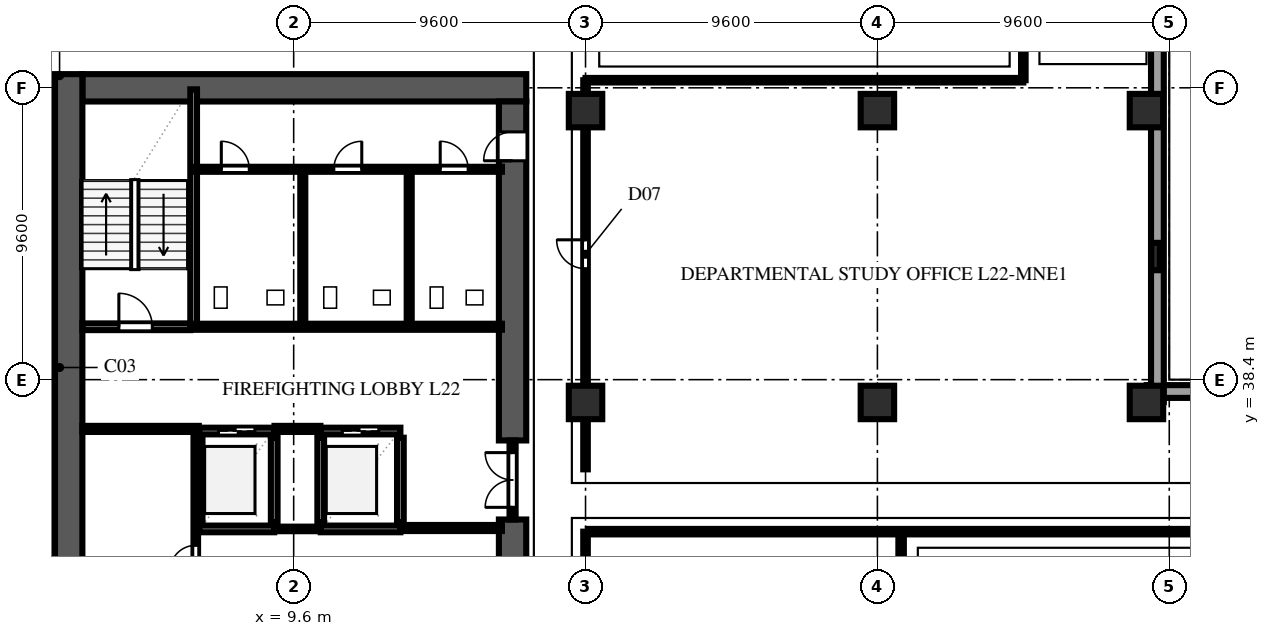
"""IFC4 building model, lengths in metres.
Left out: names, types, materials, properties, quantities, classifications, styles, units other than length and angle.
Written with IfcOpenShell. Run it as: python <this file> out.ifc"""

import sys

from ifc_helpers import new_model, si_unit, direction, frame, frame_2d, origin, origin_2d, place, context, subcontext, project, spatial, rectangle, extrude, element, fill, save


model = new_model("IFC4")
c1 = context("Model", 3, precision=1e-05, world=origin(), true_north=direction((0.0, 1.0)))
c2 = subcontext(c1, "Body", "Model", "MODEL_VIEW")
j1 = project(units=[si_unit("LENGTHUNIT", "METRE"), si_unit("PLANEANGLEUNIT", "RADIAN")], contexts=[c1])
p1 = place(None, origin())
s1 = spatial("IfcSite", under=j1, at=p1, CompositionType="ELEMENT")
p2 = place(p1, origin())
s2 = spatial("IfcBuilding", under=s1, at=p2, CompositionType="ELEMENT")
p3 = place(p2, frame((0.0, 0.0, 88.8)))
s3 = spatial("IfcBuildingStorey", under=s2, at=p3, CompositionType="ELEMENT", Elevation=88.8)
p4 = place(p3, frame((2.65, 48.0, 0.0), z_axis=(0.0, 0.0, 1.0), x_axis=(1.0, 0.0, 0.0)))
e1 = element("IfcWall", 1, at=p4, inside=s3, PredefinedType="SHEAR", context=c2, shape_type="SweptSolid", body=[
    extrude(rectangle(XDim=14.6, YDim=0.9, at=frame_2d((7.3, 0.0))), origin(), (0.0, 0.0, 1.0), 3.54),
])
p5 = place(p3, frame((2.2, 9.15, 0.0), z_axis=(0.0, 0.0, 1.0), x_axis=(0.0, 1.0, 0.0)))
e2 = element("IfcWall", 2, at=p5, inside=s3, PredefinedType="SHEAR", context=c2, shape_type="SweptSolid", body=[
    extrude(rectangle(XDim=39.3, YDim=0.9, at=frame_2d((19.65, 0.0))), origin(), (0.0, 0.0, 1.0), 3.54),
])
p6 = place(p3, frame((16.8, 26.0, 0.0), z_axis=(0.0, 0.0, 1.0), x_axis=(0.0, 1.0, 0.0)))
e3 = element("IfcWall", 3, at=p6, inside=s3, PredefinedType="SHEAR", context=c2, shape_type="SweptSolid", body=[
    extrude(rectangle(XDim=7.8, YDim=0.9, at=frame_2d((3.9, 0.0))), origin(), (0.0, 0.0, 1.0), 3.54),
])
p7 = place(p3, frame((16.8, 36.4, 0.0), z_axis=(0.0, 0.0, 1.0), x_axis=(0.0, 1.0, 0.0)))
e4 = element("IfcWall", 4, at=p7, inside=s3, PredefinedType="SHEAR", context=c2, shape_type="SweptSolid", body=[
    extrude(rectangle(XDim=11.15, YDim=0.9, at=frame_2d((5.575, 0.0))), origin(), (0.0, 0.0, 1.0), 3.54),
])
p8 = place(p7, frame((9.2, 0.0, 0.0)))
e5 = element("IfcOpeningElement", 5, at=p8, cuts=e4, PredefinedType="OPENING", context=c2, shape_type="SweptSolid", body=[
    extrude(rectangle(XDim=0.95, YDim=2.15, at=frame_2d((0.475, 1.075))), frame((0.0, 0.462, 0.0), z_axis=(0.0, -1.0, 0.0), x_axis=(1.0, 0.0, 0.0)), (0.0, 0.0, 1.0), 0.924),
])
for number, where, z_axis, x_axis in (
    (6, (19.2, 37.65, 0.0), (0.0, 0.0, 1.0), (1.0, 0.0, 0.0)),
    (7, (19.2, 47.25, 0.0), (0.0, 0.0, 1.0), (1.0, 0.0, 0.0)),
    (8, (28.8, 37.65, 0.0), (0.0, 0.0, 1.0), (1.0, 0.0, 0.0)),
    (9, (28.8, 47.25, 0.0), (0.0, 0.0, 1.0), (1.0, 0.0, 0.0)),
    (10, (37.65, 37.65, 0.0), (0.0, 0.0, 1.0), (1.0, 0.0, 0.0)),
    (11, (37.65, 47.25, 0.0), (0.0, 0.0, 1.0), (1.0, 0.0, 0.0)),
):
    element("IfcColumn", number, at=place(p3, frame(where, z_axis=z_axis, x_axis=x_axis)), inside=s3, PredefinedType="COLUMN", context=c2, shape_type="SweptSolid", body=[
        extrude(rectangle(XDim=1.1, YDim=1.1, at=origin_2d()), origin(), (0.0, 0.0, 1.0), 3.8),
    ])
p9 = place(p3, frame((37.95, 42.45, 0.0), z_axis=(0.0, 0.0, 1.0), x_axis=(0.0, 1.0, 0.0)))
e12 = element("IfcColumn", 12, at=p9, inside=s3, PredefinedType="PILASTER", context=c2, shape_type="SweptSolid", body=[
    extrude(rectangle(XDim=0.9, YDim=0.28, at=origin_2d()), origin(), (0.0, 0.0, 1.0), 3.8),
])
for number, where, z_axis, x_axis in (
    (13, (65.36, 38.01, 0.0), (0.0, 0.0, 1.0), (-1.0, 0.0, 0.0)),
    (14, (38.01, 37.66, 0.0), (0.0, 0.0, 1.0), (0.0, 1.0, 0.0)),
):
    element("IfcWall", number, at=place(p3, frame(where, z_axis=z_axis, x_axis=x_axis)), inside=s3, PredefinedType="SOLIDWALL", context=c2, shape_type="SweptSolid", body=[
        extrude(rectangle(XDim=27.7, YDim=0.42, at=frame_2d((13.85, 0.0))), origin(), (0.0, 0.0, 1.0), 3.54),
    ])
p10 = place(p3, frame((2.65, 40.14, 0.0), z_axis=(0.0, 0.0, 1.0), x_axis=(1.0, 0.0, 0.0)))
e15 = element("IfcWall", 15, at=p10, inside=s3, PredefinedType="SOLIDWALL", context=c2, shape_type="SweptSolid", body=[
    extrude(rectangle(XDim=3.55, YDim=0.22, at=frame_2d((1.775, 0.0))), origin(), (0.0, 0.0, 1.0), 3.54),
])
p11 = place(p10, frame((1.2, 0.0, 0.0)))
e16 = element("IfcOpeningElement", 16, at=p11, cuts=e15, PredefinedType="OPENING", context=c2, shape_type="SweptSolid", body=[
    extrude(rectangle(XDim=1.1, YDim=2.2, at=frame_2d((0.55, 1.1))), frame((0.0, 0.122, 0.0), z_axis=(0.0, -1.0, 0.0), x_axis=(1.0, 0.0, 0.0)), (0.0, 0.0, 1.0), 0.244),
])
p12 = place(p3, frame((6.31, 40.14, 0.0), z_axis=(0.0, 0.0, 1.0), x_axis=(0.0, 1.0, 0.0)))
e17 = element("IfcWall", 17, at=p12, inside=s3, PredefinedType="SOLIDWALL", context=c2, shape_type="SweptSolid", body=[
    extrude(rectangle(XDim=7.81, YDim=0.22, at=frame_2d((3.905, 0.0))), origin(), (0.0, 0.0, 1.0), 3.54),
])
for number, where, z_axis, x_axis in (
    (18, (6.49, 33.71, 0.0), (0.0, 0.0, 1.0), (0.0, 1.0, 0.0)),
    (19, (8.96, 33.71, 0.0), (0.0, 0.0, 1.0), (0.0, 1.0, 0.0)),
):
    element("IfcWall", number, at=place(p3, frame(where, z_axis=z_axis, x_axis=x_axis)), inside=s3, PredefinedType="SOLIDWALL", context=c2, shape_type="SweptSolid", body=[
        extrude(rectangle(XDim=2.78, YDim=0.22, at=frame_2d((1.39, 0.0))), origin(), (0.0, 0.0, 1.0), 3.54),
    ])
p13 = place(p3, frame((6.49, 33.49, 0.0), z_axis=(0.0, 0.0, 1.0), x_axis=(1.0, 0.0, 0.0)))
e20 = element("IfcWall", 20, at=p13, inside=s3, PredefinedType="SOLIDWALL", context=c2, shape_type="SweptSolid", body=[
    extrude(rectangle(XDim=2.47, YDim=0.22, at=frame_2d((1.235, 0.0))), origin(), (0.0, 0.0, 1.0), 3.54),
])
p14 = place(p3, frame((6.49, 36.71, 0.0), z_axis=(0.0, 0.0, 1.0), x_axis=(1.0, 0.0, 0.0)))
e21 = element("IfcWall", 21, at=p14, inside=s3, PredefinedType="SOLIDWALL", context=c2, shape_type="SweptSolid", body=[
    extrude(rectangle(XDim=2.47, YDim=0.22, at=frame_2d((1.235, 0.0))), origin(), (0.0, 0.0, 1.0), 3.54),
])
p15 = place(p14, frame((0.635, 0.0, 0.0)))
e22 = element("IfcOpeningElement", 22, at=p15, cuts=e21, PredefinedType="OPENING", context=c2, shape_type="SweptSolid", body=[
    extrude(rectangle(XDim=1.2, YDim=2.2, at=frame_2d((0.6, 1.1))), frame((0.0, 0.122, 0.0), z_axis=(0.0, -1.0, 0.0), x_axis=(1.0, 0.0, 0.0)), (0.0, 0.0, 1.0), 0.244),
])
for number, where, z_axis, x_axis in (
    (23, (10.49, 33.71, 0.0), (0.0, 0.0, 1.0), (0.0, 1.0, 0.0)),
    (24, (13.11, 33.71, 0.0), (0.0, 0.0, 1.0), (0.0, 1.0, 0.0)),
):
    element("IfcWall", number, at=place(p3, frame(where, z_axis=z_axis, x_axis=x_axis)), inside=s3, PredefinedType="SOLIDWALL", context=c2, shape_type="SweptSolid", body=[
        extrude(rectangle(XDim=2.78, YDim=0.22, at=frame_2d((1.39, 0.0))), origin(), (0.0, 0.0, 1.0), 3.54),
    ])
p16 = place(p3, frame((10.49, 33.49, 0.0), z_axis=(0.0, 0.0, 1.0), x_axis=(1.0, 0.0, 0.0)))
e25 = element("IfcWall", 25, at=p16, inside=s3, PredefinedType="SOLIDWALL", context=c2, shape_type="SweptSolid", body=[
    extrude(rectangle(XDim=2.62, YDim=0.22, at=frame_2d((1.31, 0.0))), origin(), (0.0, 0.0, 1.0), 3.54),
])
p17 = place(p3, frame((10.49, 36.71, 0.0), z_axis=(0.0, 0.0, 1.0), x_axis=(1.0, 0.0, 0.0)))
e26 = element("IfcWall", 26, at=p17, inside=s3, PredefinedType="SOLIDWALL", context=c2, shape_type="SweptSolid", body=[
    extrude(rectangle(XDim=2.62, YDim=0.22, at=frame_2d((1.31, 0.0))), origin(), (0.0, 0.0, 1.0), 3.54),
])
p18 = place(p17, frame((0.71, 0.0, 0.0)))
e27 = element("IfcOpeningElement", 27, at=p18, cuts=e26, PredefinedType="OPENING", context=c2, shape_type="SweptSolid", body=[
    extrude(rectangle(XDim=1.2, YDim=2.2, at=frame_2d((0.6, 1.1))), frame((0.0, 0.122, 0.0), z_axis=(0.0, -1.0, 0.0), x_axis=(1.0, 0.0, 0.0)), (0.0, 0.0, 1.0), 0.244),
])
p19 = place(p3, frame((2.65, 36.78, 0.0), z_axis=(0.0, 0.0, 1.0), x_axis=(1.0, 0.0, 0.0)))
e28 = element("IfcWall", 28, at=p19, inside=s3, PredefinedType="SOLIDWALL", context=c2, shape_type="SweptSolid", body=[
    extrude(rectangle(XDim=3.83, YDim=0.2, at=frame_2d((1.915, 0.0))), origin(), (0.0, 0.0, 1.0), 3.54),
])
p20 = place(p3, frame((8.97, 36.78, 0.0), z_axis=(0.0, 0.0, 1.0), x_axis=(1.0, 0.0, 0.0)))
e29 = element("IfcWall", 29, at=p20, inside=s3, PredefinedType="SOLIDWALL", context=c2, shape_type="SweptSolid", body=[
    extrude(rectangle(XDim=1.51, YDim=0.2, at=frame_2d((0.755, 0.0))), origin(), (0.0, 0.0, 1.0), 3.54),
])
p21 = place(p3, frame((13.12, 33.52, 0.0), z_axis=(0.0, 0.0, 1.0), x_axis=(1.0, 0.0, 0.0)))
e30 = element("IfcWall", 30, at=p21, inside=s3, PredefinedType="SOLIDWALL", context=c2, shape_type="SweptSolid", body=[
    extrude(rectangle(XDim=3.33, YDim=0.2, at=frame_2d((1.665, 0.0))), origin(), (0.0, 0.0, 1.0), 3.54),
])
p22 = place(p3, frame((6.32, 40.14, 0.0), z_axis=(0.0, 0.0, 1.0), x_axis=(1.0, 0.0, 0.0)))
e31 = element("IfcWall", 31, at=p22, inside=s3, PredefinedType="SOLIDWALL", context=c2, shape_type="SweptSolid", body=[
    extrude(rectangle(XDim=10.13, YDim=0.2, at=frame_2d((5.065, 0.0))), origin(), (0.0, 0.0, 1.0), 3.54),
])
p23 = place(p3, frame((16.8, 33.8, 0.0), z_axis=(0.0, 0.0, 1.0), x_axis=(0.0, 1.0, 0.0)))
e32 = element("IfcWall", 32, at=p23, inside=s3, PredefinedType="SOLIDWALL", context=c2, shape_type="SweptSolid", body=[
    extrude(rectangle(XDim=2.6, YDim=0.2, at=frame_2d((1.3, 0.0))), origin(), (0.0, 0.0, 1.0), 3.54),
])
p24 = place(p23, frame((0.4, 0.0, 0.0)))
e33 = element("IfcOpeningElement", 33, at=p24, cuts=e32, PredefinedType="OPENING", context=c2, shape_type="SweptSolid", body=[
    extrude(rectangle(XDim=1.8, YDim=2.2, at=frame_2d((0.9, 1.1))), frame((0.0, 0.112, 0.0), z_axis=(0.0, -1.0, 0.0), x_axis=(1.0, 0.0, 0.0)), (0.0, 0.0, 1.0), 0.224),
])
p25 = place(p3, frame((8.965, 33.49, 0.0), z_axis=(0.0, 0.0, 1.0), x_axis=(1.0, 0.0, 0.0)))
e34 = element("IfcWall", 34, at=p25, inside=s3, PredefinedType="PARTITIONING", context=c2, shape_type="SweptSolid", body=[
    extrude(rectangle(XDim=1.52, YDim=0.15, at=frame_2d((0.76, 0.0))), origin(), (0.0, 0.0, 1.0), 3.54),
])
p26 = place(p3, frame((6.38, 17.8, 0.0), z_axis=(0.0, 0.0, 1.0), x_axis=(0.0, 1.0, 0.0)))
e35 = element("IfcWall", 35, at=p26, inside=s3, PredefinedType="PARTITIONING", context=c2, shape_type="SweptSolid", body=[
    extrude(rectangle(XDim=18.98, YDim=0.15, at=frame_2d((9.49, 0.0))), origin(), (0.0, 0.0, 1.0), 3.54),
])
p27 = place(p26, frame((14.3, 0.0, 0.0)))
e36 = element("IfcOpeningElement", 36, at=p27, cuts=e35, PredefinedType="OPENING", context=c2, shape_type="SweptSolid", body=[
    extrude(rectangle(XDim=0.85, YDim=2.1, at=frame_2d((0.425, 1.05))), frame((0.0, 0.087, 0.0), z_axis=(0.0, -1.0, 0.0), x_axis=(1.0, 0.0, 0.0)), (0.0, 0.0, 1.0), 0.174),
])
p28 = place(p3, frame((6.32, 45.32, 0.0), z_axis=(0.0, 0.0, 1.0), x_axis=(1.0, 0.0, 0.0)))
e37 = element("IfcWall", 37, at=p28, inside=s3, PredefinedType="PLUMBINGWALL", context=c2, shape_type="SweptSolid", body=[
    extrude(rectangle(XDim=10.13, YDim=0.165, at=frame_2d((5.065, 0.0))), origin(), (0.0, 0.0, 1.0), 3.54),
])
p29 = place(p28, frame((0.9, 0.0, 0.0)))
e38 = element("IfcOpeningElement", 38, at=p29, cuts=e37, PredefinedType="OPENING", context=c2, shape_type="SweptSolid", body=[
    extrude(rectangle(XDim=0.92, YDim=2.15, at=frame_2d((0.46, 1.075))), frame((0.0, 0.094, 0.0), z_axis=(0.0, -1.0, 0.0), x_axis=(1.0, 0.0, 0.0)), (0.0, 0.0, 1.0), 0.189),
])
p30 = place(p28, frame((4.6, 0.0, 0.0)))
e39 = element("IfcOpeningElement", 39, at=p30, cuts=e37, PredefinedType="OPENING", context=c2, shape_type="SweptSolid", body=[
    extrude(rectangle(XDim=0.92, YDim=2.15, at=frame_2d((0.46, 1.075))), frame((0.0, 0.094, 0.0), z_axis=(0.0, -1.0, 0.0), x_axis=(1.0, 0.0, 0.0)), (0.0, 0.0, 1.0), 0.189),
])
p31 = place(p28, frame((8.1, 0.0, 0.0)))
e40 = element("IfcOpeningElement", 40, at=p31, cuts=e37, PredefinedType="OPENING", context=c2, shape_type="SweptSolid", body=[
    extrude(rectangle(XDim=0.92, YDim=2.15, at=frame_2d((0.46, 1.075))), frame((0.0, 0.094, 0.0), z_axis=(0.0, -1.0, 0.0), x_axis=(1.0, 0.0, 0.0)), (0.0, 0.0, 1.0), 0.189),
])
for number, where, z_axis, x_axis in (
    (41, (9.9, 40.4, 0.0), (0.0, 0.0, 1.0), (0.0, 1.0, 0.0)),
    (42, (13.4, 40.4, 0.0), (0.0, 0.0, 1.0), (0.0, 1.0, 0.0)),
):
    element("IfcWall", number, at=place(p3, frame(where, z_axis=z_axis, x_axis=x_axis)), inside=s3, PredefinedType="PLUMBINGWALL", context=c2, shape_type="SweptSolid", body=[
        extrude(rectangle(XDim=4.92, YDim=0.165, at=frame_2d((2.46, 0.0))), origin(), (0.0, 0.0, 1.0), 3.54),
    ])
p32 = place(p3, frame((0.85, 48.0, 0.0), z_axis=(0.0, 0.0, 1.0), x_axis=(1.0, 0.0, 0.0)))
e43 = element("IfcWall", 43, at=p32, inside=s3, PredefinedType="SOLIDWALL", context=c2, shape_type="SweptSolid", body=[
    extrude(rectangle(XDim=0.895, YDim=0.2, at=frame_2d((0.448, 0.0))), origin(), (0.0, 0.0, 1.0), 3.54),
])
p33 = place(p3, frame((19.2, 9.55, 0.0), z_axis=(0.0, 0.0, 1.0), x_axis=(0.0, 1.0, 0.0)))
e44 = element("IfcWall", 44, at=p33, inside=s3, PredefinedType="PARTITIONING", context=c2, shape_type="SweptSolid", body=[
    extrude(rectangle(XDim=23.85, YDim=0.15, at=frame_2d((11.925, 0.0))), origin(), (0.0, 0.0, 1.0), 2.924),
])
p34 = place(p33, frame((14.0, 0.0, 0.0)))
e45 = element("IfcOpeningElement", 45, at=p34, cuts=e44, PredefinedType="OPENING", context=c2, shape_type="SweptSolid", body=[
    extrude(rectangle(XDim=0.95, YDim=2.15, at=frame_2d((0.475, 1.075))), frame((0.0, 0.087, 0.0), z_axis=(0.0, -1.0, 0.0), x_axis=(1.0, 0.0, 0.0)), (0.0, 0.0, 1.0), 0.174),
])
p35 = place(p3, frame((29.58, 18.025, 0.0), z_axis=(0.0, 0.0, 1.0), x_axis=(0.0, 1.0, 0.0)))
e46 = element("IfcWall", 46, at=p35, inside=s3, PredefinedType="PARTITIONING", context=c2, shape_type="SweptSolid", body=[
    extrude(rectangle(XDim=15.28, YDim=0.18, at=frame_2d((7.64, 0.0))), origin(), (0.0, 0.0, 1.0), 3.54),
])
p36 = place(p3, frame((19.28, 33.4, 0.0), z_axis=(0.0, 0.0, 1.0), x_axis=(1.0, 0.0, 0.0)))
e47 = element("IfcWall", 47, at=p36, inside=s3, PredefinedType="PARTITIONING", context=c2, shape_type="SweptSolid", body=[
    extrude(rectangle(XDim=41.07, YDim=0.18, at=frame_2d((20.535, 0.0))), origin(), (0.0, 0.0, 1.0), 3.54),
])
p37 = place(p36, frame((22.67, 0.0, 0.0)))
e48 = element("IfcOpeningElement", 48, at=p37, cuts=e47, PredefinedType="OPENING", context=c2, shape_type="SweptSolid", body=[
    extrude(rectangle(XDim=0.95, YDim=2.15, at=frame_2d((0.475, 1.075))), frame((0.0, 0.102, 0.0), z_axis=(0.0, -1.0, 0.0), x_axis=(1.0, 0.0, 0.0)), (0.0, 0.0, 1.0), 0.204),
])
p38 = place(p3, frame((19.2, 35.45, 0.0), z_axis=(0.0, 0.0, 1.0), x_axis=(0.0, 1.0, 0.0)))
e49 = element("IfcWall", 49, at=p38, inside=s3, PredefinedType="PARTITIONING", context=c2, shape_type="SweptSolid", body=[
    extrude(rectangle(XDim=12.8, YDim=0.15, at=frame_2d((6.4, 0.0))), origin(), (0.0, 0.0, 1.0), 2.924),
])
p39 = place(p38, frame((6.6, 0.0, 0.0)))
e50 = element("IfcOpeningElement", 50, at=p39, cuts=e49, PredefinedType="OPENING", context=c2, shape_type="SweptSolid", body=[
    extrude(rectangle(XDim=0.95, YDim=2.15, at=frame_2d((0.475, 1.075))), frame((0.0, 0.087, 0.0), z_axis=(0.0, -1.0, 0.0), x_axis=(1.0, 0.0, 0.0)), (0.0, 0.0, 1.0), 0.174),
])
p40 = place(p3, frame((19.2, 48.25, 0.0), z_axis=(0.0, 0.0, 1.0), x_axis=(1.0, 0.0, 0.0)))
e51 = element("IfcWall", 51, at=p40, inside=s3, PredefinedType="PARTITIONING", context=c2, shape_type="SweptSolid", body=[
    extrude(rectangle(XDim=14.4, YDim=0.15, at=frame_2d((7.2, 0.0))), origin(), (0.0, 0.0, 1.0), 3.54),
])
p41 = place(p3, frame((33.6, 48.25, 0.0), z_axis=(0.0, 0.0, 1.0), x_axis=(0.0, 1.0, 0.0)))
e52 = element("IfcWall", 52, at=p41, inside=s3, PredefinedType="PARTITIONING", context=c2, shape_type="SweptSolid", body=[
    extrude(rectangle(XDim=18.73, YDim=0.15, at=frame_2d((9.365, 0.0))), origin(), (0.0, 0.0, 1.0), 3.54),
])
p42 = place(p41, frame((3.4, 0.0, 0.0)))
e53 = element("IfcOpeningElement", 53, at=p42, cuts=e52, PredefinedType="OPENING", context=c2, shape_type="SweptSolid", body=[
    extrude(rectangle(XDim=0.95, YDim=2.15, at=frame_2d((0.475, 1.075))), frame((0.0, 0.087, 0.0), z_axis=(0.0, -1.0, 0.0), x_axis=(1.0, 0.0, 0.0)), (0.0, 0.0, 1.0), 0.174),
])
p43 = place(p11, origin())
e54 = element("IfcDoor", 54, at=p43, inside=s3, OperationType="SINGLE_SWING_LEFT", PredefinedType="DOOR", context=c2, shape_type="SweptSolid", body=[
    extrude(rectangle(XDim=1.1, YDim=2.2, at=frame_2d((0.55, 1.1))), frame((0.0, 0.025, 0.0), z_axis=(0.0, -1.0, 0.0), x_axis=(1.0, 0.0, 0.0)), (0.0, 0.0, 1.0), 0.05),
])
fill(e16, e54)
p44 = place(p15, origin())
e55 = element("IfcDoor", 55, at=p44, inside=s3, OperationType="DOUBLE_DOOR_SLIDING", PredefinedType="DOOR", context=c2, shape_type="SweptSolid", body=[
    extrude(rectangle(XDim=1.2, YDim=2.2, at=frame_2d((0.6, 1.1))), frame((0.0, 0.025, 0.0), z_axis=(0.0, -1.0, 0.0), x_axis=(1.0, 0.0, 0.0)), (0.0, 0.0, 1.0), 0.05),
])
fill(e22, e55)
p45 = place(p18, origin())
e56 = element("IfcDoor", 56, at=p45, inside=s3, OperationType="DOUBLE_DOOR_SLIDING", PredefinedType="DOOR", context=c2, shape_type="SweptSolid", body=[
    extrude(rectangle(XDim=1.2, YDim=2.2, at=frame_2d((0.6, 1.1))), frame((0.0, 0.025, 0.0), z_axis=(0.0, -1.0, 0.0), x_axis=(1.0, 0.0, 0.0)), (0.0, 0.0, 1.0), 0.05),
])
fill(e27, e56)
p46 = place(p8, origin())
e57 = element("IfcDoor", 57, at=p46, inside=s3, OperationType="SINGLE_SWING_LEFT", PredefinedType="DOOR", context=c2, shape_type="SweptSolid", body=[
    extrude(rectangle(XDim=0.95, YDim=2.15, at=frame_2d((0.475, 1.075))), frame((0.0, 0.025, 0.0), z_axis=(0.0, -1.0, 0.0), x_axis=(1.0, 0.0, 0.0)), (0.0, 0.0, 1.0), 0.05),
])
fill(e5, e57)
p47 = place(p24, origin())
e58 = element("IfcDoor", 58, at=p47, inside=s3, OperationType="DOUBLE_DOOR_SINGLE_SWING", PredefinedType="DOOR", context=c2, shape_type="SweptSolid", body=[
    extrude(rectangle(XDim=1.8, YDim=2.2, at=frame_2d((0.9, 1.1))), frame((0.0, 0.025, 0.0), z_axis=(0.0, -1.0, 0.0), x_axis=(1.0, 0.0, 0.0)), (0.0, 0.0, 1.0), 0.05),
])
fill(e33, e58)
p48 = place(p27, origin())
e59 = element("IfcDoor", 59, at=p48, inside=s3, OperationType="SINGLE_SWING_LEFT", PredefinedType="DOOR", context=c2, shape_type="SweptSolid", body=[
    extrude(rectangle(XDim=0.85, YDim=2.1, at=frame_2d((0.425, 1.05))), frame((0.0, 0.025, 0.0), z_axis=(0.0, -1.0, 0.0), x_axis=(1.0, 0.0, 0.0)), (0.0, 0.0, 1.0), 0.05),
])
fill(e36, e59)
p49 = place(p29, origin())
e60 = element("IfcDoor", 60, at=p49, inside=s3, OperationType="SINGLE_SWING_LEFT", PredefinedType="DOOR", context=c2, shape_type="SweptSolid", body=[
    extrude(rectangle(XDim=0.92, YDim=2.15, at=frame_2d((0.46, 1.075))), frame((0.0, 0.025, 0.0), z_axis=(0.0, -1.0, 0.0), x_axis=(1.0, 0.0, 0.0)), (0.0, 0.0, 1.0), 0.05),
])
fill(e38, e60)
p50 = place(p30, origin())
e61 = element("IfcDoor", 61, at=p50, inside=s3, OperationType="SINGLE_SWING_RIGHT", PredefinedType="DOOR", context=c2, shape_type="SweptSolid", body=[
    extrude(rectangle(XDim=0.92, YDim=2.15, at=frame_2d((0.46, 1.075))), frame((0.0, 0.025, 0.0), z_axis=(0.0, -1.0, 0.0), x_axis=(1.0, 0.0, 0.0)), (0.0, 0.0, 1.0), 0.05),
])
fill(e39, e61)
p51 = place(p31, origin())
e62 = element("IfcDoor", 62, at=p51, inside=s3, OperationType="SINGLE_SWING_LEFT", PredefinedType="DOOR", context=c2, shape_type="SweptSolid", body=[
    extrude(rectangle(XDim=0.92, YDim=2.15, at=frame_2d((0.46, 1.075))), frame((0.0, 0.025, 0.0), z_axis=(0.0, -1.0, 0.0), x_axis=(1.0, 0.0, 0.0)), (0.0, 0.0, 1.0), 0.05),
])
fill(e40, e62)
p52 = place(p39, origin())
e63 = element("IfcDoor", 63, at=p52, inside=s3, OperationType="SINGLE_SWING_RIGHT", PredefinedType="DOOR", context=c2, shape_type="SweptSolid", body=[
    extrude(rectangle(XDim=0.95, YDim=2.15, at=frame_2d((0.475, 1.075))), frame((0.0, 0.025, 0.0), z_axis=(0.0, -1.0, 0.0), x_axis=(1.0, 0.0, 0.0)), (0.0, 0.0, 1.0), 0.05),
])
fill(e50, e63)
save(model, sys.argv[1])
